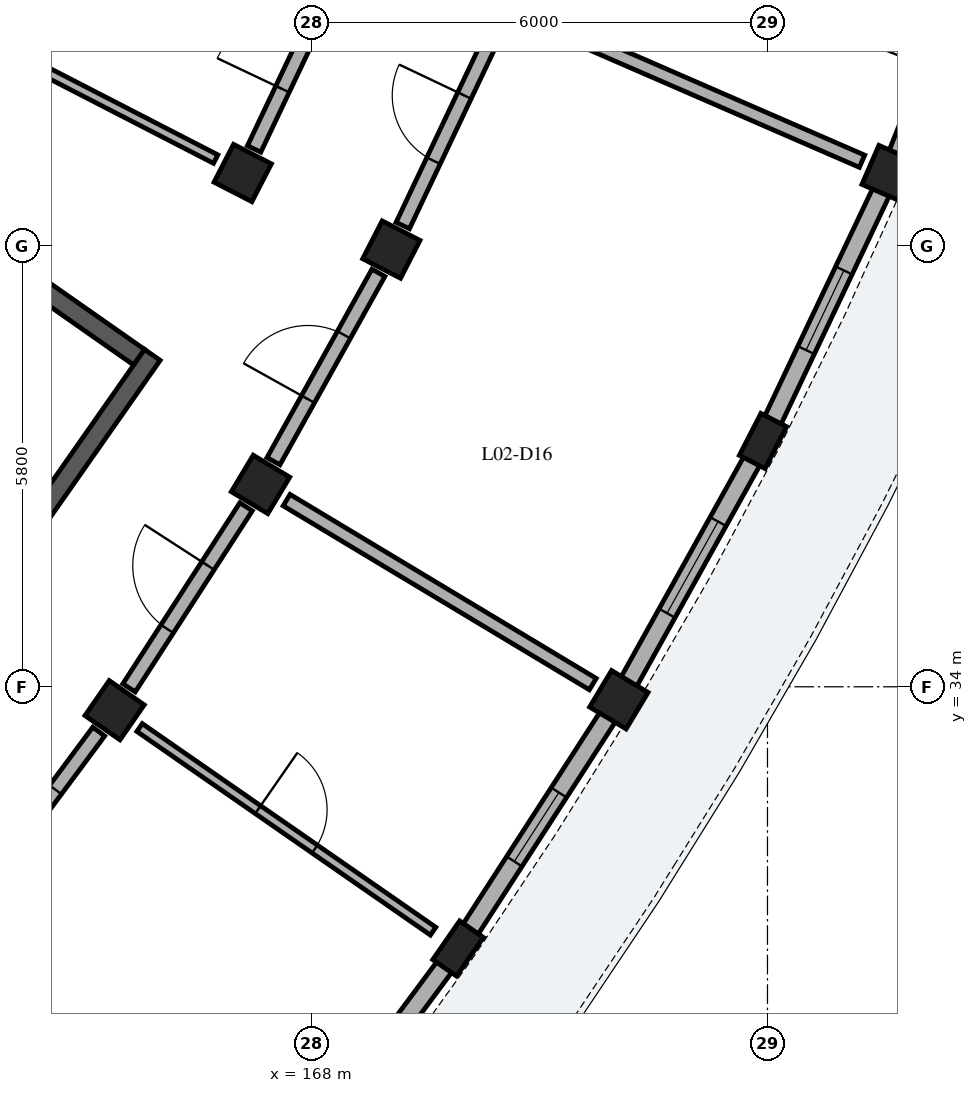
"""IFC4 building model, lengths in metres.
Left out: names, types, materials, properties, quantities, classifications, styles, units other than length and angle.
Written with IfcOpenShell. Run it as: python <this file> out.ifc"""

import sys

from ifc_helpers import new_model, si_unit, direction, frame, frame_2d, origin, origin_2d, place, context, subcontext, project, spatial, rectangle, extrude, element, fill, save


model = new_model("IFC4")
c1 = context("Model", 3, precision=1e-05, world=origin(), true_north=direction((0.0, 1.0)))
c2 = subcontext(c1, "Body", "Model", "MODEL_VIEW")
j1 = project(units=[si_unit("LENGTHUNIT", "METRE"), si_unit("PLANEANGLEUNIT", "RADIAN")], contexts=[c1])
p1 = place(None, origin())
s1 = spatial("IfcSite", under=j1, at=p1, CompositionType="ELEMENT")
p2 = place(p1, origin())
s2 = spatial("IfcBuilding", under=s1, at=p2, CompositionType="ELEMENT")
p3 = place(p2, frame((0.0, 0.0, 8.84)))
s3 = spatial("IfcBuildingStorey", under=s2, at=p3, CompositionType="ELEMENT", Elevation=8.84)
p4 = place(p3, frame((165.733, 38.336, 0.0), z_axis=(0.0, 0.0, 1.0), x_axis=(-0.819153711596, 0.573574055182, 0.0)))
e1 = element("IfcWall", 1, at=p4, inside=s3, PredefinedType="SHEAR", context=c2, shape_type="SweptSolid", body=[
    extrude(rectangle(XDim=6.6, YDim=0.25, at=frame_2d((3.3, 0.0))), origin(), (0.0, 0.0, 1.0), 3.11),
])
p5 = place(p3, frame((165.907, 38.366, 0.0), z_axis=(0.0, 0.0, 1.0), x_axis=(-0.573582112484, -0.819148069789, 0.0)))
e2 = element("IfcWall", 2, at=p5, inside=s3, PredefinedType="SHEAR", context=c2, shape_type="SweptSolid", body=[
    extrude(rectangle(XDim=3.42, YDim=0.25, at=frame_2d((1.71, 0.0))), origin(), (0.0, 0.0, 1.0), 3.11),
])
p6 = place(p3, frame((165.41, 33.692, 0.0), z_axis=(0.0, 0.0, 1.0), x_axis=(0.821646937942, -0.569996762596, 0.0)))
e3 = element("IfcColumn", 3, at=p6, inside=s3, PredefinedType="COLUMN", context=c2, shape_type="SweptSolid", body=[
    extrude(rectangle(XDim=0.56, YDim=0.56, at=origin_2d()), origin(), (0.0, 0.0, 1.0), 3.105),
])
p7 = place(p3, frame((169.929, 30.557, 0.0), z_axis=(0.0, 0.0, 1.0), x_axis=(0.821646937942, -0.569996762596, 0.0)))
e4 = element("IfcColumn", 4, at=p7, inside=s3, PredefinedType="PILASTER", context=c2, shape_type="SweptSolid", body=[
    extrude(rectangle(XDim=0.38, YDim=0.62, at=origin_2d()), origin(), (0.0, 0.0, 1.0), 3.105),
])
for number, where, z_axis, x_axis in (
    (5, (167.33, 36.662, 0.0), (0.0, 0.0, 1.0), (0.857, -0.515, 0.0)),
    (6, (172.044, 33.83, 0.0), (0.0, 0.0, 1.0), (0.857, -0.515, 0.0)),
    (7, (167.095, 40.759, 0.0), (0.0, 0.0, 1.0), (0.889, -0.458, 0.0)),
    (8, (169.051, 39.752, 0.0), (0.0, 0.0, 1.0), (0.889, -0.458, 0.0)),
):
    element("IfcColumn", number, at=place(p3, frame(where, z_axis=z_axis, x_axis=x_axis)), inside=s3, PredefinedType="COLUMN", context=c2, shape_type="SweptSolid", body=[
        extrude(rectangle(XDim=0.56, YDim=0.56, at=origin_2d()), origin(), (0.0, 0.0, 1.0), 3.105),
    ])
p8 = place(p3, frame((173.941, 37.234, 0.0), z_axis=(0.0, 0.0, 1.0), x_axis=(0.889017141486, -0.457873915117, 0.0)))
e9 = element("IfcColumn", 9, at=p8, inside=s3, PredefinedType="PILASTER", context=c2, shape_type="SweptSolid", body=[
    extrude(rectangle(XDim=0.38, YDim=0.62, at=origin_2d()), origin(), (0.0, 0.0, 1.0), 3.105),
])
p9 = place(p3, frame((175.611, 40.754, 0.0), z_axis=(0.0, 0.0, 1.0), x_axis=(0.917060074385, -0.398749068925, 0.0)))
e10 = element("IfcColumn", 10, at=p9, inside=s3, PredefinedType="COLUMN", context=c2, shape_type="SweptSolid", body=[
    extrude(rectangle(XDim=0.56, YDim=0.56, at=origin_2d()), origin(), (0.0, 0.0, 1.0), 3.105),
])
p10 = place(p3, frame((167.753, 27.63, 0.0), z_axis=(0.0, 0.0, 1.0), x_axis=(0.596611432616, 0.802530247699, 0.0)))
e11 = element("IfcWall", 11, at=p10, inside=s3, PredefinedType="SOLIDWALL", context=c2, shape_type="SweptSolid", body=[
    extrude(rectangle(XDim=3.487, YDim=0.24, at=frame_2d((1.743, 0.0))), origin(), (0.0, 0.0, 1.0), 2.355),
])
p11 = place(p10, frame((1.233, 0.0, 0.0)))
e12 = element("IfcOpeningElement", 12, at=p11, cuts=e11, PredefinedType="OPENING", context=c2, shape_type="SweptSolid", body=[
    extrude(rectangle(XDim=1.02, YDim=2.14, at=frame_2d((0.51, 1.07))), frame((0.0, 0.13, 0.0), z_axis=(0.0, -1.0, 0.0), x_axis=(1.0, 0.0, 0.0)), (0.0, 0.0, 1.0), 0.26),
])
p12 = place(p3, frame((170.016, 30.691, 0.0), z_axis=(0.0, 0.0, 1.0), x_axis=(0.542833164741, 0.839840553472, 0.0)))
e13 = element("IfcWall", 13, at=p12, inside=s3, PredefinedType="SOLIDWALL", context=c2, shape_type="SweptSolid", body=[
    extrude(rectangle(XDim=3.487, YDim=0.24, at=frame_2d((1.743, 0.0))), origin(), (0.0, 0.0, 1.0), 2.355),
])
p13 = place(p12, frame((1.203, 0.0, 0.55)))
e14 = element("IfcOpeningElement", 14, at=p13, cuts=e13, PredefinedType="OPENING", context=c2, shape_type="SweptSolid", body=[
    extrude(rectangle(XDim=1.08, YDim=1.45, at=frame_2d((0.54, 0.725))), frame((0.0, 0.13, 0.0), z_axis=(0.0, -1.0, 0.0), x_axis=(1.0, 0.0, 0.0)), (0.0, 0.0, 1.0), 0.26),
])
p14 = place(p3, frame((172.166, 34.048, 0.0), z_axis=(0.0, 0.0, 1.0), x_axis=(0.486706738221, 0.87356542455, 0.0)))
e15 = element("IfcWall", 15, at=p14, inside=s3, PredefinedType="SOLIDWALL", context=c2, shape_type="SweptSolid", body=[
    extrude(rectangle(XDim=3.487, YDim=0.24, at=frame_2d((1.743, 0.0))), origin(), (0.0, 0.0, 1.0), 2.355),
])
p15 = place(p14, frame((1.053, 0.0, 0.55)))
e16 = element("IfcOpeningElement", 16, at=p15, cuts=e15, PredefinedType="OPENING", context=c2, shape_type="SweptSolid", body=[
    extrude(rectangle(XDim=1.38, YDim=1.56, at=frame_2d((0.69, 0.78))), frame((0.0, 0.13, 0.0), z_axis=(0.0, -1.0, 0.0), x_axis=(1.0, 0.0, 0.0)), (0.0, 0.0, 1.0), 0.26),
])
p16 = place(p3, frame((174.01, 37.378, 0.0), z_axis=(0.0, 0.0, 1.0), x_axis=(0.428576879122, 0.903505317462, 0.0)))
e17 = element("IfcWall", 17, at=p16, inside=s3, PredefinedType="SOLIDWALL", context=c2, shape_type="SweptSolid", body=[
    extrude(rectangle(XDim=3.487, YDim=0.24, at=frame_2d((1.743, 0.0))), origin(), (0.0, 0.0, 1.0), 2.355),
])
p17 = place(p16, frame((1.163, 0.0, 0.55)))
e18 = element("IfcOpeningElement", 18, at=p17, cuts=e17, PredefinedType="OPENING", context=c2, shape_type="SweptSolid", body=[
    extrude(rectangle(XDim=1.16, YDim=1.485, at=frame_2d((0.58, 0.743))), frame((0.0, 0.13, 0.0), z_axis=(0.0, -1.0, 0.0), x_axis=(1.0, 0.0, 0.0)), (0.0, 0.0, 1.0), 0.26),
])
p18 = place(p3, frame((175.703, 40.987, 0.0), z_axis=(0.0, 0.0, 1.0), x_axis=(0.368503667074, 0.929626294461, 0.0)))
e19 = element("IfcWall", 19, at=p18, inside=s3, PredefinedType="SOLIDWALL", context=c2, shape_type="SweptSolid", body=[
    extrude(rectangle(XDim=3.487, YDim=0.24, at=frame_2d((1.743, 0.0))), origin(), (0.0, 0.0, 1.0), 2.355),
])
p19 = place(p18, frame((1.233, 0.0, 0.0)))
e20 = element("IfcOpeningElement", 20, at=p19, cuts=e19, PredefinedType="OPENING", context=c2, shape_type="SweptSolid", body=[
    extrude(rectangle(XDim=1.02, YDim=2.14, at=frame_2d((0.51, 1.07))), frame((0.0, 0.13, 0.0), z_axis=(0.0, -1.0, 0.0), x_axis=(1.0, 0.0, 0.0)), (0.0, 0.0, 1.0), 0.26),
])
p20 = place(p3, frame((163.509, 31.134, 0.0), z_axis=(0.0, 0.0, 1.0), x_axis=(0.596552136601, 0.802574325727, 0.0)))
e21 = element("IfcWall", 21, at=p20, inside=s3, PredefinedType="PARTITIONING", context=c2, shape_type="SweptSolid", body=[
    extrude(rectangle(XDim=2.837, YDim=0.195, at=frame_2d((1.418, 0.0))), origin(), (0.0, 0.0, 1.0), 2.37),
])
p21 = place(p20, frame((0.954, 0.0, 0.0)))
e22 = element("IfcOpeningElement", 22, at=p21, cuts=e21, PredefinedType="OPENING", context=c2, shape_type="SweptSolid", body=[
    extrude(rectangle(XDim=0.93, YDim=2.12, at=frame_2d((0.465, 1.06))), frame((0.0, 0.107, 0.0), z_axis=(0.0, -1.0, 0.0), x_axis=(1.0, 0.0, 0.0)), (0.0, 0.0, 1.0), 0.215),
])
p22 = place(p3, frame((165.739, 33.464, 0.0), z_axis=(0.0, 0.0, 1.0), x_axis=(0.821638260647, -0.570009270663, 0.0)))
e23 = element("IfcWall", 23, at=p22, inside=s3, PredefinedType="PARTITIONING", context=c2, shape_type="SweptSolid", body=[
    extrude(rectangle(XDim=4.7, YDim=0.125, at=frame_2d((2.35, 0.0))), origin(), (0.0, 0.0, 1.0), 2.37),
])
p23 = place(p22, frame((1.895, 0.0, 0.0)))
e24 = element("IfcOpeningElement", 24, at=p23, cuts=e23, PredefinedType="OPENING", context=c2, shape_type="SweptSolid", body=[
    extrude(rectangle(XDim=0.91, YDim=2.1, at=frame_2d((0.455, 1.05))), frame((0.0, 0.073, 0.0), z_axis=(0.0, -1.0, 0.0), x_axis=(1.0, 0.0, 0.0)), (0.0, 0.0, 1.0), 0.145),
])
p24 = place(p3, frame((165.6, 33.986, 0.0), z_axis=(0.0, 0.0, 1.0), x_axis=(0.542787304957, 0.83987019329, 0.0)))
e25 = element("IfcWall", 25, at=p24, inside=s3, PredefinedType="PARTITIONING", context=c2, shape_type="SweptSolid", body=[
    extrude(rectangle(XDim=2.837, YDim=0.195, at=frame_2d((1.418, 0.0))), origin(), (0.0, 0.0, 1.0), 2.37),
])
p25 = place(p24, frame((0.924, 0.0, 0.0)))
e26 = element("IfcOpeningElement", 26, at=p25, cuts=e25, PredefinedType="OPENING", context=c2, shape_type="SweptSolid", body=[
    extrude(rectangle(XDim=0.99, YDim=2.16, at=frame_2d((0.495, 1.08))), frame((0.0, 0.107, 0.0), z_axis=(0.0, -1.0, 0.0), x_axis=(1.0, 0.0, 0.0)), (0.0, 0.0, 1.0), 0.215),
])
p26 = place(p3, frame((167.673, 36.456, 0.0), z_axis=(0.0, 0.0, 1.0), x_axis=(0.857139805444, -0.515083831937, 0.0)))
e27 = element("IfcWall", 27, at=p26, inside=s3, PredefinedType="PARTITIONING", context=c2, shape_type="SweptSolid", body=[
    extrude(rectangle(XDim=4.7, YDim=0.175, at=frame_2d((2.35, 0.0))), origin(), (0.0, 0.0, 1.0), 2.37),
])
p27 = place(p3, frame((167.5, 36.968, 0.0), z_axis=(0.0, 0.0, 1.0), x_axis=(0.48673124079, 0.8735517725, 0.0)))
e28 = element("IfcWall", 28, at=p27, inside=s3, PredefinedType="PARTITIONING", context=c2, shape_type="SweptSolid", body=[
    extrude(rectangle(XDim=2.837, YDim=0.195, at=frame_2d((1.418, 0.0))), origin(), (0.0, 0.0, 1.0), 2.37),
])
p28 = place(p27, frame((0.934, 0.0, 0.0)))
e29 = element("IfcOpeningElement", 29, at=p28, cuts=e28, PredefinedType="OPENING", context=c2, shape_type="SweptSolid", body=[
    extrude(rectangle(XDim=0.97, YDim=2.15, at=frame_2d((0.485, 1.075))), frame((0.0, 0.107, 0.0), z_axis=(0.0, -1.0, 0.0), x_axis=(1.0, 0.0, 0.0)), (0.0, 0.0, 1.0), 0.215),
])
p29 = place(p3, frame((160.872, 43.964, 0.0), z_axis=(0.0, 0.0, 1.0), x_axis=(0.889022010753, -0.457864460727, 0.0)))
e30 = element("IfcWall", 30, at=p29, inside=s3, PredefinedType="PARTITIONING", context=c2, shape_type="SweptSolid", body=[
    extrude(rectangle(XDim=6.6, YDim=0.125, at=frame_2d((3.3, 0.0))), origin(), (0.0, 0.0, 1.0), 2.37),
])
p30 = place(p29, frame((2.845, 0.0, 0.0)))
e31 = element("IfcOpeningElement", 31, at=p30, cuts=e30, PredefinedType="OPENING", context=c2, shape_type="SweptSolid", body=[
    extrude(rectangle(XDim=0.91, YDim=2.1, at=frame_2d((0.455, 1.05))), frame((0.0, 0.073, 0.0), z_axis=(0.0, -1.0, 0.0), x_axis=(1.0, 0.0, 0.0)), (0.0, 0.0, 1.0), 0.145),
])
p31 = place(p3, frame((169.201, 40.068, 0.0), z_axis=(0.0, 0.0, 1.0), x_axis=(0.428493237107, 0.903544988229, 0.0)))
e32 = element("IfcWall", 32, at=p31, inside=s3, PredefinedType="PARTITIONING", context=c2, shape_type="SweptSolid", body=[
    extrude(rectangle(XDim=2.837, YDim=0.195, at=frame_2d((1.418, 0.0))), origin(), (0.0, 0.0, 1.0), 2.37),
])
p32 = place(p31, frame((0.944, 0.0, 0.0)))
e33 = element("IfcOpeningElement", 33, at=p32, cuts=e32, PredefinedType="OPENING", context=c2, shape_type="SweptSolid", body=[
    extrude(rectangle(XDim=0.95, YDim=2.13, at=frame_2d((0.475, 1.065))), frame((0.0, 0.107, 0.0), z_axis=(0.0, -1.0, 0.0), x_axis=(1.0, 0.0, 0.0)), (0.0, 0.0, 1.0), 0.215),
])
p33 = place(p3, frame((167.246, 41.075, 0.0), z_axis=(0.0, 0.0, 1.0), x_axis=(0.428550049392, 0.903518043631, 0.0)))
e34 = element("IfcWall", 34, at=p33, inside=s3, PredefinedType="PARTITIONING", context=c2, shape_type="SweptSolid", body=[
    extrude(rectangle(XDim=2.693, YDim=0.195, at=frame_2d((1.346, 0.0))), origin(), (0.0, 0.0, 1.0), 2.37),
])
p34 = place(p33, frame((0.872, 0.0, 0.0)))
e35 = element("IfcOpeningElement", 35, at=p34, cuts=e34, PredefinedType="OPENING", context=c2, shape_type="SweptSolid", body=[
    extrude(rectangle(XDim=0.95, YDim=2.13, at=frame_2d((0.475, 1.065))), frame((0.0, 0.107, 0.0), z_axis=(0.0, -1.0, 0.0), x_axis=(1.0, 0.0, 0.0)), (0.0, 0.0, 1.0), 0.215),
])
p35 = place(p3, frame((170.934, 42.788, 0.0), z_axis=(0.0, 0.0, 1.0), x_axis=(0.917071707884, -0.398722312643, 0.0)))
e36 = element("IfcWall", 36, at=p35, inside=s3, PredefinedType="PARTITIONING", context=c2, shape_type="SweptSolid", body=[
    extrude(rectangle(XDim=4.7, YDim=0.175, at=frame_2d((2.35, 0.0))), origin(), (0.0, 0.0, 1.0), 2.37),
])
p36 = place(p13, origin())
e37 = element("IfcWindow", 37, at=p36, inside=s3, PartitioningType="SINGLE_PANEL", PredefinedType="WINDOW", context=c2, shape_type="SweptSolid", body=[
    extrude(rectangle(XDim=1.08, YDim=1.45, at=frame_2d((0.54, 0.725))), frame((0.0, 0.03, 0.0), z_axis=(0.0, -1.0, 0.0), x_axis=(1.0, 0.0, 0.0)), (0.0, 0.0, 1.0), 0.06),
])
fill(e14, e37)
p37 = place(p15, origin())
e38 = element("IfcWindow", 38, at=p37, inside=s3, PartitioningType="SINGLE_PANEL", PredefinedType="WINDOW", context=c2, shape_type="SweptSolid", body=[
    extrude(rectangle(XDim=1.38, YDim=1.56, at=frame_2d((0.69, 0.78))), frame((0.0, 0.03, 0.0), z_axis=(0.0, -1.0, 0.0), x_axis=(1.0, 0.0, 0.0)), (0.0, 0.0, 1.0), 0.06),
])
fill(e16, e38)
p38 = place(p17, origin())
e39 = element("IfcWindow", 39, at=p38, inside=s3, PartitioningType="SINGLE_PANEL", PredefinedType="WINDOW", context=c2, shape_type="SweptSolid", body=[
    extrude(rectangle(XDim=1.16, YDim=1.485, at=frame_2d((0.58, 0.743))), frame((0.0, 0.03, 0.0), z_axis=(0.0, -1.0, 0.0), x_axis=(1.0, 0.0, 0.0)), (0.0, 0.0, 1.0), 0.06),
])
fill(e18, e39)
p39 = place(p21, origin())
e40 = element("IfcDoor", 40, at=p39, inside=s3, OperationType="SINGLE_SWING_LEFT", PredefinedType="DOOR", context=c2, shape_type="SweptSolid", body=[
    extrude(rectangle(XDim=0.93, YDim=2.12, at=frame_2d((0.465, 1.06))), frame((0.0, 0.025, 0.0), z_axis=(0.0, -1.0, 0.0), x_axis=(1.0, 0.0, 0.0)), (0.0, 0.0, 1.0), 0.05),
])
fill(e22, e40)
p40 = place(p23, origin())
e41 = element("IfcDoor", 41, at=p40, inside=s3, OperationType="SINGLE_SWING_LEFT", PredefinedType="DOOR", context=c2, shape_type="SweptSolid", body=[
    extrude(rectangle(XDim=0.91, YDim=2.1, at=frame_2d((0.455, 1.05))), frame((0.0, 0.025, 0.0), z_axis=(0.0, -1.0, 0.0), x_axis=(1.0, 0.0, 0.0)), (0.0, 0.0, 1.0), 0.05),
])
fill(e24, e41)
p41 = place(p25, origin())
e42 = element("IfcDoor", 42, at=p41, inside=s3, OperationType="SINGLE_SWING_RIGHT", PredefinedType="DOOR", context=c2, shape_type="SweptSolid", body=[
    extrude(rectangle(XDim=0.99, YDim=2.16, at=frame_2d((0.495, 1.08))), frame((0.0, 0.025, 0.0), z_axis=(0.0, -1.0, 0.0), x_axis=(1.0, 0.0, 0.0)), (0.0, 0.0, 1.0), 0.05),
])
fill(e26, e42)
p42 = place(p28, origin())
e43 = element("IfcDoor", 43, at=p42, inside=s3, OperationType="SINGLE_SWING_LEFT", PredefinedType="DOOR", context=c2, shape_type="SweptSolid", body=[
    extrude(rectangle(XDim=0.97, YDim=2.15, at=frame_2d((0.485, 1.075))), frame((0.0, 0.025, 0.0), z_axis=(0.0, -1.0, 0.0), x_axis=(1.0, 0.0, 0.0)), (0.0, 0.0, 1.0), 0.05),
])
fill(e29, e43)
p43 = place(p32, origin())
e44 = element("IfcDoor", 44, at=p43, inside=s3, OperationType="SINGLE_SWING_RIGHT", PredefinedType="DOOR", context=c2, shape_type="SweptSolid", body=[
    extrude(rectangle(XDim=0.95, YDim=2.13, at=frame_2d((0.475, 1.065))), frame((0.0, 0.025, 0.0), z_axis=(0.0, -1.0, 0.0), x_axis=(1.0, 0.0, 0.0)), (0.0, 0.0, 1.0), 0.05),
])
fill(e33, e44)
p44 = place(p34, origin())
e45 = element("IfcDoor", 45, at=p44, inside=s3, OperationType="SINGLE_SWING_LEFT", PredefinedType="DOOR", context=c2, shape_type="SweptSolid", body=[
    extrude(rectangle(XDim=0.95, YDim=2.13, at=frame_2d((0.475, 1.065))), frame((0.0, 0.025, 0.0), z_axis=(0.0, -1.0, 0.0), x_axis=(1.0, 0.0, 0.0)), (0.0, 0.0, 1.0), 0.05),
])
fill(e35, e45)
save(model, sys.argv[1])
